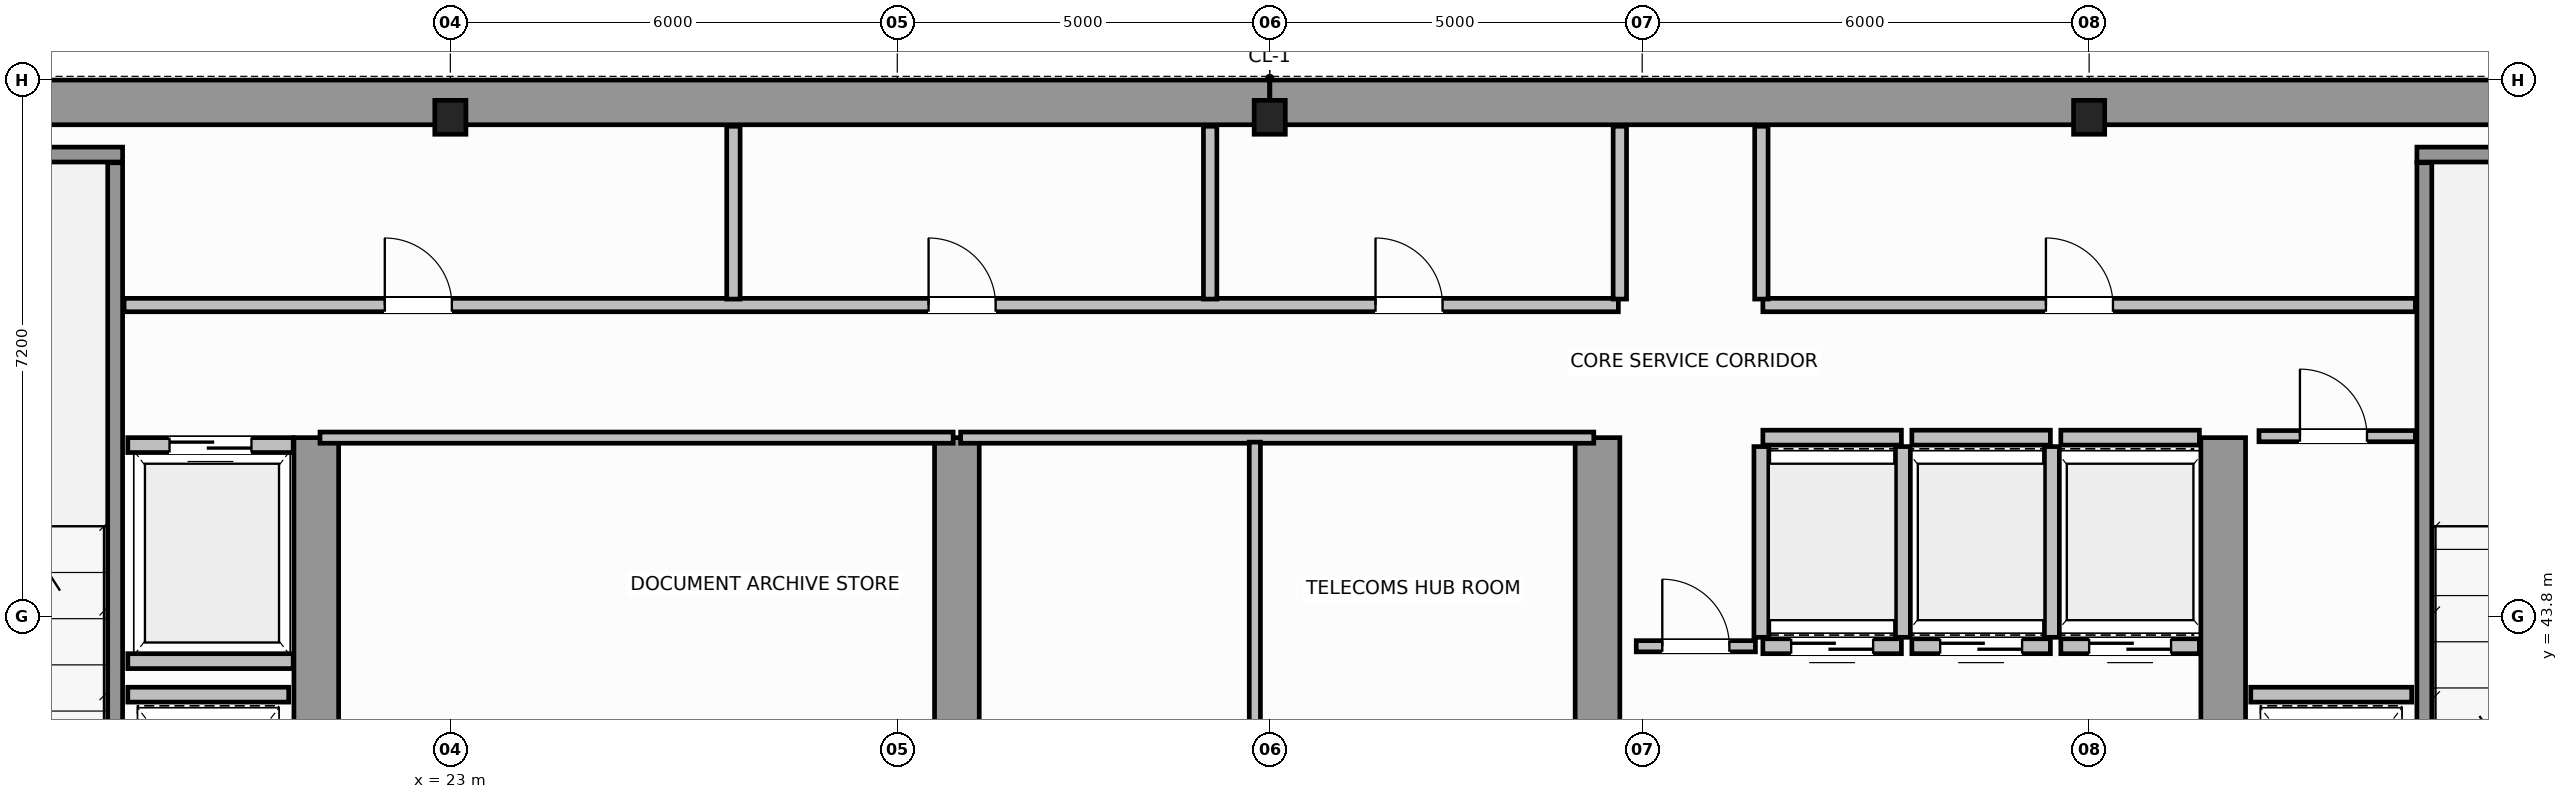
"""IFC4 building model, lengths in metres.
Left out: names, types, materials, properties, quantities, classifications, styles, units other than length and angle.
Written with IfcOpenShell. Run it as: python <this file> out.ifc"""

import sys

from ifc_helpers import new_model, si_unit, direction, frame, frame_2d, origin, origin_2d, place, context, subcontext, project, spatial, rectangle, i_section, extrude, source, transform, mapped, element, fill, save


model = new_model("IFC4")
c1 = context("Model", 3, precision=1e-05, world=origin(), true_north=direction((0.0, 1.0)))
c2 = subcontext(c1, "Body", "Model", "MODEL_VIEW")
j1 = project(units=[si_unit("LENGTHUNIT", "METRE"), si_unit("PLANEANGLEUNIT", "RADIAN")], contexts=[c1])
p1 = place(None, origin())
s1 = spatial("IfcSite", under=j1, at=p1, CompositionType="ELEMENT")
p2 = place(p1, origin())
s2 = spatial("IfcBuilding", under=s1, at=p2, CompositionType="ELEMENT")
p3 = place(p2, frame((0.0, 0.0, 242.2)))
s3 = spatial("IfcBuildingStorey", under=s2, at=p3, CompositionType="ELEMENT", Elevation=242.2)
m1 = source(origin(), c2, "Body", "SweptSolid", [
    extrude(i_section(OverallWidth=0.418, OverallDepth=0.455, WebThickness=0.042, FlangeThickness=0.058, FilletRadius=0.015, at=origin_2d()), origin(), (0.0, 0.0, 1.0), 3.8),
])
for number, where, z_axis, x_axis in (
    (1, (23.0, 50.5, 0.0), (0.0, 0.0, 1.0), (1.0, 0.0, 0.0)),
    (2, (34.0, 50.5, 0.0), (0.0, 0.0, 1.0), (1.0, 0.0, 0.0)),
    (3, (45.0, 50.5, 0.0), (0.0, 0.0, 1.0), (1.0, 0.0, 0.0)),
):
    element("IfcColumn", number, at=place(p3, frame(where, z_axis=z_axis, x_axis=x_axis)), inside=s3, PredefinedType="COLUMN", context=c2, shape_type="MappedRepresentation", body=[
        mapped(m1, transform((0.0, 0.0, 0.0), scale=1.0)),
    ])
for number, where, z_axis, x_axis in (
    (4, (14.304, 50.7, 0.0), (0.0, 0.0, 1.0), (1.0, 0.0, 0.0)),
    (5, (34.002, 50.7, 0.0), (0.0, 0.0, 1.0), (1.0, 0.0, 0.0)),
):
    element("IfcWall", number, at=place(p3, frame(where, z_axis=z_axis, x_axis=x_axis)), inside=s3, PredefinedType="SHEAR", context=c2, shape_type="SweptSolid", body=[
        extrude(rectangle(XDim=19.694, YDim=0.6, at=frame_2d((9.847, 0.0))), origin(), (0.0, 0.0, 1.0), 3.8),
    ])
for number, where, z_axis, x_axis in (
    (6, (21.2, 36.82, 0.0), (0.0, 0.0, 1.0), (0.0, 1.0, 0.0)),
    (7, (29.8, 36.82, 0.0), (0.0, 0.0, 1.0), (0.0, 1.0, 0.0)),
    (8, (38.4, 36.82, 0.0), (0.0, 0.0, 1.0), (0.0, 1.0, 0.0)),
    (9, (46.8, 36.82, 0.0), (0.0, 0.0, 1.0), (0.0, 1.0, 0.0)),
):
    element("IfcWall", number, at=place(p3, frame(where, z_axis=z_axis, x_axis=x_axis)), inside=s3, PredefinedType="SHEAR", context=c2, shape_type="SweptSolid", body=[
        extrude(rectangle(XDim=9.38, YDim=0.6, at=frame_2d((4.69, 0.0))), origin(), (0.0, 0.0, 1.0), 3.8),
    ])
p4 = place(p3, frame((14.3, 50.0, 0.0), z_axis=(0.0, 0.0, 1.0), x_axis=(1.0, 0.0, 0.0)))
e10 = element("IfcWall", 10, at=p4, inside=s3, PredefinedType="SOLIDWALL", context=c2, shape_type="SweptSolid", body=[
    extrude(rectangle(XDim=4.3, YDim=0.2, at=frame_2d((2.15, 0.0))), origin(), (0.0, 0.0, 1.0), 3.8),
])
p5 = place(p3, frame((18.5, 39.96, 0.0), z_axis=(0.0, 0.0, 1.0), x_axis=(0.0, 1.0, 0.0)))
e11 = element("IfcWall", 11, at=p5, inside=s3, PredefinedType="SOLIDWALL", context=c2, shape_type="SweptSolid", body=[
    extrude(rectangle(XDim=9.93, YDim=0.2, at=frame_2d((4.965, 0.0))), origin(), (0.0, 0.0, 1.0), 3.8),
])
p6 = place(p3, frame((49.4, 50.0, 0.0), z_axis=(0.0, 0.0, 1.0), x_axis=(1.0, 0.0, 0.0)))
e12 = element("IfcWall", 12, at=p6, inside=s3, PredefinedType="SOLIDWALL", context=c2, shape_type="SweptSolid", body=[
    extrude(rectangle(XDim=4.3, YDim=0.2, at=frame_2d((2.15, 0.0))), origin(), (0.0, 0.0, 1.0), 3.8),
])
p7 = place(p3, frame((49.5, 39.96, 0.0), z_axis=(0.0, 0.0, 1.0), x_axis=(0.0, 1.0, 0.0)))
e13 = element("IfcWall", 13, at=p7, inside=s3, PredefinedType="SOLIDWALL", context=c2, shape_type="SweptSolid", body=[
    extrude(rectangle(XDim=9.93, YDim=0.2, at=frame_2d((4.965, 0.0))), origin(), (0.0, 0.0, 1.0), 3.8),
])
p8 = place(p3, frame((40.62, 43.4, 0.0), z_axis=(0.0, 0.0, 1.0), x_axis=(1.0, 0.0, 0.0)))
e14 = element("IfcWall", 14, at=p8, inside=s3, PredefinedType="SOLIDWALL", context=c2, shape_type="SweptSolid", body=[
    extrude(rectangle(XDim=1.86, YDim=0.2, at=frame_2d((0.93, 0.0))), origin(), (0.0, 0.0, 1.0), 3.58),
])
p9 = place(p8, frame((0.38, 0.0, 0.0)))
e15 = element("IfcOpeningElement", 15, at=p9, cuts=e14, PredefinedType="OPENING", context=c2, shape_type="SweptSolid", body=[
    extrude(rectangle(XDim=1.1, YDim=2.15, at=frame_2d((0.55, 1.075))), frame((0.0, 0.11, 0.0), z_axis=(0.0, -1.0, 0.0), x_axis=(1.0, 0.0, 0.0)), (0.0, 0.0, 1.0), 0.22),
])
p10 = place(p3, frame((40.62, 46.2, 0.0), z_axis=(0.0, 0.0, 1.0), x_axis=(1.0, 0.0, 0.0)))
e16 = element("IfcWall", 16, at=p10, inside=s3, PredefinedType="SOLIDWALL", context=c2, shape_type="SweptSolid", body=[
    extrude(rectangle(XDim=1.86, YDim=0.2, at=frame_2d((0.93, 0.0))), origin(), (0.0, 0.0, 1.0), 3.58),
])
for number, where, z_axis, x_axis in (
    (17, (40.6, 43.52, 0.0), (0.0, 0.0, 1.0), (0.0, 1.0, 0.0)),
    (18, (42.5, 43.52, 0.0), (0.0, 0.0, 1.0), (0.0, 1.0, 0.0)),
):
    element("IfcWall", number, at=place(p3, frame(where, z_axis=z_axis, x_axis=x_axis)), inside=s3, PredefinedType="SOLIDWALL", context=c2, shape_type="SweptSolid", body=[
        extrude(rectangle(XDim=2.56, YDim=0.2, at=frame_2d((1.28, 0.0))), origin(), (0.0, 0.0, 1.0), 3.58),
    ])
p11 = place(p3, frame((42.62, 43.4, 0.0), z_axis=(0.0, 0.0, 1.0), x_axis=(1.0, 0.0, 0.0)))
e19 = element("IfcWall", 19, at=p11, inside=s3, PredefinedType="SOLIDWALL", context=c2, shape_type="SweptSolid", body=[
    extrude(rectangle(XDim=1.86, YDim=0.2, at=frame_2d((0.93, 0.0))), origin(), (0.0, 0.0, 1.0), 3.58),
])
p12 = place(p11, frame((0.38, 0.0, 0.0)))
e20 = element("IfcOpeningElement", 20, at=p12, cuts=e19, PredefinedType="OPENING", context=c2, shape_type="SweptSolid", body=[
    extrude(rectangle(XDim=1.1, YDim=2.15, at=frame_2d((0.55, 1.075))), frame((0.0, 0.11, 0.0), z_axis=(0.0, -1.0, 0.0), x_axis=(1.0, 0.0, 0.0)), (0.0, 0.0, 1.0), 0.22),
])
p13 = place(p3, frame((42.62, 46.2, 0.0), z_axis=(0.0, 0.0, 1.0), x_axis=(1.0, 0.0, 0.0)))
e21 = element("IfcWall", 21, at=p13, inside=s3, PredefinedType="SOLIDWALL", context=c2, shape_type="SweptSolid", body=[
    extrude(rectangle(XDim=1.86, YDim=0.2, at=frame_2d((0.93, 0.0))), origin(), (0.0, 0.0, 1.0), 3.58),
])
p14 = place(p3, frame((44.5, 43.52, 0.0), z_axis=(0.0, 0.0, 1.0), x_axis=(0.0, 1.0, 0.0)))
e22 = element("IfcWall", 22, at=p14, inside=s3, PredefinedType="SOLIDWALL", context=c2, shape_type="SweptSolid", body=[
    extrude(rectangle(XDim=2.56, YDim=0.2, at=frame_2d((1.28, 0.0))), origin(), (0.0, 0.0, 1.0), 3.58),
])
p15 = place(p3, frame((44.62, 43.4, 0.0), z_axis=(0.0, 0.0, 1.0), x_axis=(1.0, 0.0, 0.0)))
e23 = element("IfcWall", 23, at=p15, inside=s3, PredefinedType="SOLIDWALL", context=c2, shape_type="SweptSolid", body=[
    extrude(rectangle(XDim=1.86, YDim=0.2, at=frame_2d((0.93, 0.0))), origin(), (0.0, 0.0, 1.0), 3.58),
])
p16 = place(p15, frame((0.38, 0.0, 0.0)))
e24 = element("IfcOpeningElement", 24, at=p16, cuts=e23, PredefinedType="OPENING", context=c2, shape_type="SweptSolid", body=[
    extrude(rectangle(XDim=1.1, YDim=2.15, at=frame_2d((0.55, 1.075))), frame((0.0, 0.11, 0.0), z_axis=(0.0, -1.0, 0.0), x_axis=(1.0, 0.0, 0.0)), (0.0, 0.0, 1.0), 0.22),
])
p17 = place(p3, frame((44.62, 46.2, 0.0), z_axis=(0.0, 0.0, 1.0), x_axis=(1.0, 0.0, 0.0)))
e25 = element("IfcWall", 25, at=p17, inside=s3, PredefinedType="SOLIDWALL", context=c2, shape_type="SweptSolid", body=[
    extrude(rectangle(XDim=1.86, YDim=0.2, at=frame_2d((0.93, 0.0))), origin(), (0.0, 0.0, 1.0), 3.58),
])
p18 = place(p3, frame((18.67, 46.1, 0.0), z_axis=(0.0, 0.0, 1.0), x_axis=(1.0, 0.0, 0.0)))
e26 = element("IfcWall", 26, at=p18, inside=s3, PredefinedType="SOLIDWALL", context=c2, shape_type="SweptSolid", body=[
    extrude(rectangle(XDim=2.22, YDim=0.2, at=frame_2d((1.11, 0.0))), origin(), (0.0, 0.0, 1.0), 3.58),
])
p19 = place(p18, frame((0.56, 0.0, 0.0)))
e27 = element("IfcOpeningElement", 27, at=p19, cuts=e26, PredefinedType="OPENING", context=c2, shape_type="SweptSolid", body=[
    extrude(rectangle(XDim=1.1, YDim=2.15, at=frame_2d((0.55, 1.075))), frame((0.0, 0.11, 0.0), z_axis=(0.0, -1.0, 0.0), x_axis=(1.0, 0.0, 0.0)), (0.0, 0.0, 1.0), 0.22),
])
p20 = place(p3, frame((18.67, 43.2, 0.0), z_axis=(0.0, 0.0, 1.0), x_axis=(1.0, 0.0, 0.0)))
e28 = element("IfcWall", 28, at=p20, inside=s3, PredefinedType="SOLIDWALL", context=c2, shape_type="SweptSolid", body=[
    extrude(rectangle(XDim=2.22, YDim=0.2, at=frame_2d((1.11, 0.0))), origin(), (0.0, 0.0, 1.0), 3.58),
])
for number, where, z_axis, x_axis in (
    (29, (18.67, 42.75, 0.0), (0.0, 0.0, 1.0), (1.0, 0.0, 0.0)),
    (30, (47.17, 42.75, 0.0), (0.0, 0.0, 1.0), (1.0, 0.0, 0.0)),
):
    element("IfcWall", number, at=place(p3, frame(where, z_axis=z_axis, x_axis=x_axis)), inside=s3, PredefinedType="SOLIDWALL", context=c2, shape_type="SweptSolid", body=[
        extrude(rectangle(XDim=2.16, YDim=0.2, at=frame_2d((1.08, 0.0))), origin(), (0.0, 0.0, 1.0), 3.58),
    ])
for number, where, z_axis, x_axis in (
    (31, (21.25, 46.2, 0.0), (0.0, 0.0, 1.0), (1.0, 0.0, 0.0)),
    (32, (29.85, 46.2, 0.0), (0.0, 0.0, 1.0), (1.0, 0.0, 0.0)),
):
    element("IfcWall", number, at=place(p3, frame(where, z_axis=z_axis, x_axis=x_axis)), inside=s3, PredefinedType="PARTITIONING", context=c2, shape_type="SweptSolid", body=[
        extrude(rectangle(XDim=8.5, YDim=0.15, at=frame_2d((4.25, 0.0))), origin(), (0.0, 0.0, 1.0), 3.58),
    ])
p21 = place(p3, frame((33.8, 36.56, 0.0), z_axis=(0.0, 0.0, 1.0), x_axis=(0.0, 1.0, 0.0)))
e33 = element("IfcWall", 33, at=p21, inside=s3, PredefinedType="PARTITIONING", context=c2, shape_type="SweptSolid", body=[
    extrude(rectangle(XDim=9.58, YDim=0.15, at=frame_2d((4.79, 0.0))), origin(), (0.0, 0.0, 1.0), 3.58),
])
p22 = place(p21, frame((4.2, 0.0, 0.0)))
e34 = element("IfcOpeningElement", 34, at=p22, cuts=e33, PredefinedType="OPENING", context=c2, shape_type="SweptSolid", body=[
    extrude(rectangle(XDim=0.9, YDim=2.1, at=frame_2d((0.45, 1.05))), frame((0.0, 0.085, 0.0), z_axis=(0.0, -1.0, 0.0), x_axis=(1.0, 0.0, 0.0)), (0.0, 0.0, 1.0), 0.17),
])
p23 = place(p3, frame((47.28, 46.22, 0.0), z_axis=(0.0, 0.0, 1.0), x_axis=(1.0, 0.0, 0.0)))
e35 = element("IfcWall", 35, at=p23, inside=s3, PredefinedType="PARTITIONING", context=c2, shape_type="SweptSolid", body=[
    extrude(rectangle(XDim=2.1, YDim=0.15, at=frame_2d((1.05, 0.0))), origin(), (0.0, 0.0, 1.0), 3.58),
])
p24 = place(p23, frame((0.55, 0.0, 0.0)))
e36 = element("IfcOpeningElement", 36, at=p24, cuts=e35, PredefinedType="OPENING", context=c2, shape_type="SweptSolid", body=[
    extrude(rectangle(XDim=0.9, YDim=2.1, at=frame_2d((0.45, 1.05))), frame((0.0, 0.085, 0.0), z_axis=(0.0, -1.0, 0.0), x_axis=(1.0, 0.0, 0.0)), (0.0, 0.0, 1.0), 0.17),
])
p25 = place(p3, frame((38.92, 43.4, 0.0), z_axis=(0.0, 0.0, 1.0), x_axis=(1.0, 0.0, 0.0)))
e37 = element("IfcWall", 37, at=p25, inside=s3, PredefinedType="PARTITIONING", context=c2, shape_type="SweptSolid", body=[
    extrude(rectangle(XDim=1.6, YDim=0.15, at=frame_2d((0.8, 0.0))), origin(), (0.0, 0.0, 1.0), 3.58),
])
p26 = place(p25, frame((0.35, 0.0, 0.0)))
e38 = element("IfcOpeningElement", 38, at=p26, cuts=e37, PredefinedType="OPENING", context=c2, shape_type="SweptSolid", body=[
    extrude(rectangle(XDim=0.9, YDim=2.1, at=frame_2d((0.45, 1.05))), frame((0.0, 0.085, 0.0), z_axis=(0.0, -1.0, 0.0), x_axis=(1.0, 0.0, 0.0)), (0.0, 0.0, 1.0), 0.17),
])
p27 = place(p3, frame((18.62, 47.98, 0.0), z_axis=(0.0, 0.0, 1.0), x_axis=(1.0, 0.0, 0.0)))
e39 = element("IfcWall", 39, at=p27, inside=s3, PredefinedType="PLUMBINGWALL", context=c2, shape_type="SweptSolid", body=[
    extrude(rectangle(XDim=20.06, YDim=0.18, at=frame_2d((10.03, 0.0))), origin(), (0.0, 0.0, 1.0), 3.58),
])
p28 = place(p27, frame((3.5, 0.0, 0.0)))
e40 = element("IfcOpeningElement", 40, at=p28, cuts=e39, PredefinedType="OPENING", context=c2, shape_type="SweptSolid", body=[
    extrude(rectangle(XDim=0.9, YDim=2.15, at=frame_2d((0.45, 1.075))), frame((0.0, 0.1, 0.0), z_axis=(0.0, -1.0, 0.0), x_axis=(1.0, 0.0, 0.0)), (0.0, 0.0, 1.0), 0.2),
])
p29 = place(p27, frame((10.8, 0.0, 0.0)))
e41 = element("IfcOpeningElement", 41, at=p29, cuts=e39, PredefinedType="OPENING", context=c2, shape_type="SweptSolid", body=[
    extrude(rectangle(XDim=0.9, YDim=2.15, at=frame_2d((0.45, 1.075))), frame((0.0, 0.1, 0.0), z_axis=(0.0, -1.0, 0.0), x_axis=(1.0, 0.0, 0.0)), (0.0, 0.0, 1.0), 0.2),
])
p30 = place(p27, frame((16.8, 0.0, 0.0)))
e42 = element("IfcOpeningElement", 42, at=p30, cuts=e39, PredefinedType="OPENING", context=c2, shape_type="SweptSolid", body=[
    extrude(rectangle(XDim=0.9, YDim=2.15, at=frame_2d((0.45, 1.075))), frame((0.0, 0.1, 0.0), z_axis=(0.0, -1.0, 0.0), x_axis=(1.0, 0.0, 0.0)), (0.0, 0.0, 1.0), 0.2),
])
p31 = place(p3, frame((40.62, 47.98, 0.0), z_axis=(0.0, 0.0, 1.0), x_axis=(1.0, 0.0, 0.0)))
e43 = element("IfcWall", 43, at=p31, inside=s3, PredefinedType="PLUMBINGWALL", context=c2, shape_type="SweptSolid", body=[
    extrude(rectangle(XDim=8.76, YDim=0.18, at=frame_2d((4.38, 0.0))), origin(), (0.0, 0.0, 1.0), 3.58),
])
p32 = place(p31, frame((3.8, 0.0, 0.0)))
e44 = element("IfcOpeningElement", 44, at=p32, cuts=e43, PredefinedType="OPENING", context=c2, shape_type="SweptSolid", body=[
    extrude(rectangle(XDim=0.9, YDim=2.15, at=frame_2d((0.45, 1.075))), frame((0.0, 0.1, 0.0), z_axis=(0.0, -1.0, 0.0), x_axis=(1.0, 0.0, 0.0)), (0.0, 0.0, 1.0), 0.2),
])
for number, where, z_axis, x_axis in (
    (45, (26.8, 48.06, 0.0), (0.0, 0.0, 1.0), (0.0, 1.0, 0.0)),
    (46, (33.2, 48.06, 0.0), (0.0, 0.0, 1.0), (0.0, 1.0, 0.0)),
    (47, (38.7, 48.06, 0.0), (0.0, 0.0, 1.0), (0.0, 1.0, 0.0)),
    (48, (40.6, 48.06, 0.0), (0.0, 0.0, 1.0), (0.0, 1.0, 0.0)),
):
    element("IfcWall", number, at=place(p3, frame(where, z_axis=z_axis, x_axis=x_axis)), inside=s3, PredefinedType="PLUMBINGWALL", context=c2, shape_type="SweptSolid", body=[
        extrude(rectangle(XDim=2.32, YDim=0.18, at=frame_2d((1.16, 0.0))), origin(), (0.0, 0.0, 1.0), 3.58),
    ])
m2 = source(origin(), c2, "Body", "SweptSolid", [
    extrude(rectangle(XDim=1.1, YDim=2.15, at=frame_2d((0.55, 1.075))), frame((0.0, 0.025, 0.0), z_axis=(0.0, -1.0, 0.0), x_axis=(1.0, 0.0, 0.0)), (0.0, 0.0, 1.0), 0.05),
])
p33 = place(p9, origin())
e49 = element("IfcDoor", 49, at=p33, inside=s3, OperationType="DOUBLE_DOOR_SLIDING", PredefinedType="DOOR", context=c2, shape_type="MappedRepresentation", body=[
    mapped(m2, transform((0.0, 0.0, 0.0), scale=1.0)),
])
fill(e15, e49)
p34 = place(p12, origin())
e50 = element("IfcDoor", 50, at=p34, inside=s3, OperationType="DOUBLE_DOOR_SLIDING", PredefinedType="DOOR", context=c2, shape_type="MappedRepresentation", body=[
    mapped(m2, transform((0.0, 0.0, 0.0), scale=1.0)),
])
fill(e20, e50)
p35 = place(p16, origin())
e51 = element("IfcDoor", 51, at=p35, inside=s3, OperationType="DOUBLE_DOOR_SLIDING", PredefinedType="DOOR", context=c2, shape_type="MappedRepresentation", body=[
    mapped(m2, transform((0.0, 0.0, 0.0), scale=1.0)),
])
fill(e24, e51)
p36 = place(p19, origin())
e52 = element("IfcDoor", 52, at=p36, inside=s3, OperationType="DOUBLE_DOOR_SLIDING", PredefinedType="DOOR", context=c2, shape_type="MappedRepresentation", body=[
    mapped(m2, transform((0.0, 0.0, 0.0), scale=1.0)),
])
fill(e27, e52)
m3 = source(origin(), c2, "Body", "SweptSolid", [
    extrude(rectangle(XDim=0.9, YDim=2.1, at=frame_2d((0.45, 1.05))), frame((0.0, 0.025, 0.0), z_axis=(0.0, -1.0, 0.0), x_axis=(1.0, 0.0, 0.0)), (0.0, 0.0, 1.0), 0.05),
])
p37 = place(p24, origin())
e53 = element("IfcDoor", 53, at=p37, inside=s3, OperationType="SINGLE_SWING_RIGHT", PredefinedType="DOOR", context=c2, shape_type="MappedRepresentation", body=[
    mapped(m3, transform((0.0, 0.0, 0.0), scale=1.0)),
])
fill(e36, e53)
p38 = place(p26, origin())
e54 = element("IfcDoor", 54, at=p38, inside=s3, OperationType="SINGLE_SWING_LEFT", PredefinedType="DOOR", context=c2, shape_type="MappedRepresentation", body=[
    mapped(m3, transform((0.0, 0.0, 0.0), scale=1.0)),
])
fill(e38, e54)
m4 = source(origin(), c2, "Body", "SweptSolid", [
    extrude(rectangle(XDim=0.9, YDim=2.15, at=frame_2d((0.45, 1.075))), frame((0.0, 0.025, 0.0), z_axis=(0.0, -1.0, 0.0), x_axis=(1.0, 0.0, 0.0)), (0.0, 0.0, 1.0), 0.05),
])
p39 = place(p28, origin())
e55 = element("IfcDoor", 55, at=p39, inside=s3, OperationType="SINGLE_SWING_LEFT", PredefinedType="DOOR", context=c2, shape_type="MappedRepresentation", body=[
    mapped(m4, transform((0.0, 0.0, 0.0), scale=1.0)),
])
fill(e40, e55)
p40 = place(p29, origin())
e56 = element("IfcDoor", 56, at=p40, inside=s3, OperationType="SINGLE_SWING_RIGHT", PredefinedType="DOOR", context=c2, shape_type="MappedRepresentation", body=[
    mapped(m4, transform((0.0, 0.0, 0.0), scale=1.0)),
])
fill(e41, e56)
p41 = place(p30, origin())
e57 = element("IfcDoor", 57, at=p41, inside=s3, OperationType="SINGLE_SWING_LEFT", PredefinedType="DOOR", context=c2, shape_type="MappedRepresentation", body=[
    mapped(m4, transform((0.0, 0.0, 0.0), scale=1.0)),
])
fill(e42, e57)
p42 = place(p32, origin())
e58 = element("IfcDoor", 58, at=p42, inside=s3, OperationType="SINGLE_SWING_RIGHT", PredefinedType="DOOR", context=c2, shape_type="MappedRepresentation", body=[
    mapped(m4, transform((0.0, 0.0, 0.0), scale=1.0)),
])
fill(e44, e58)
save(model, sys.argv[1])
